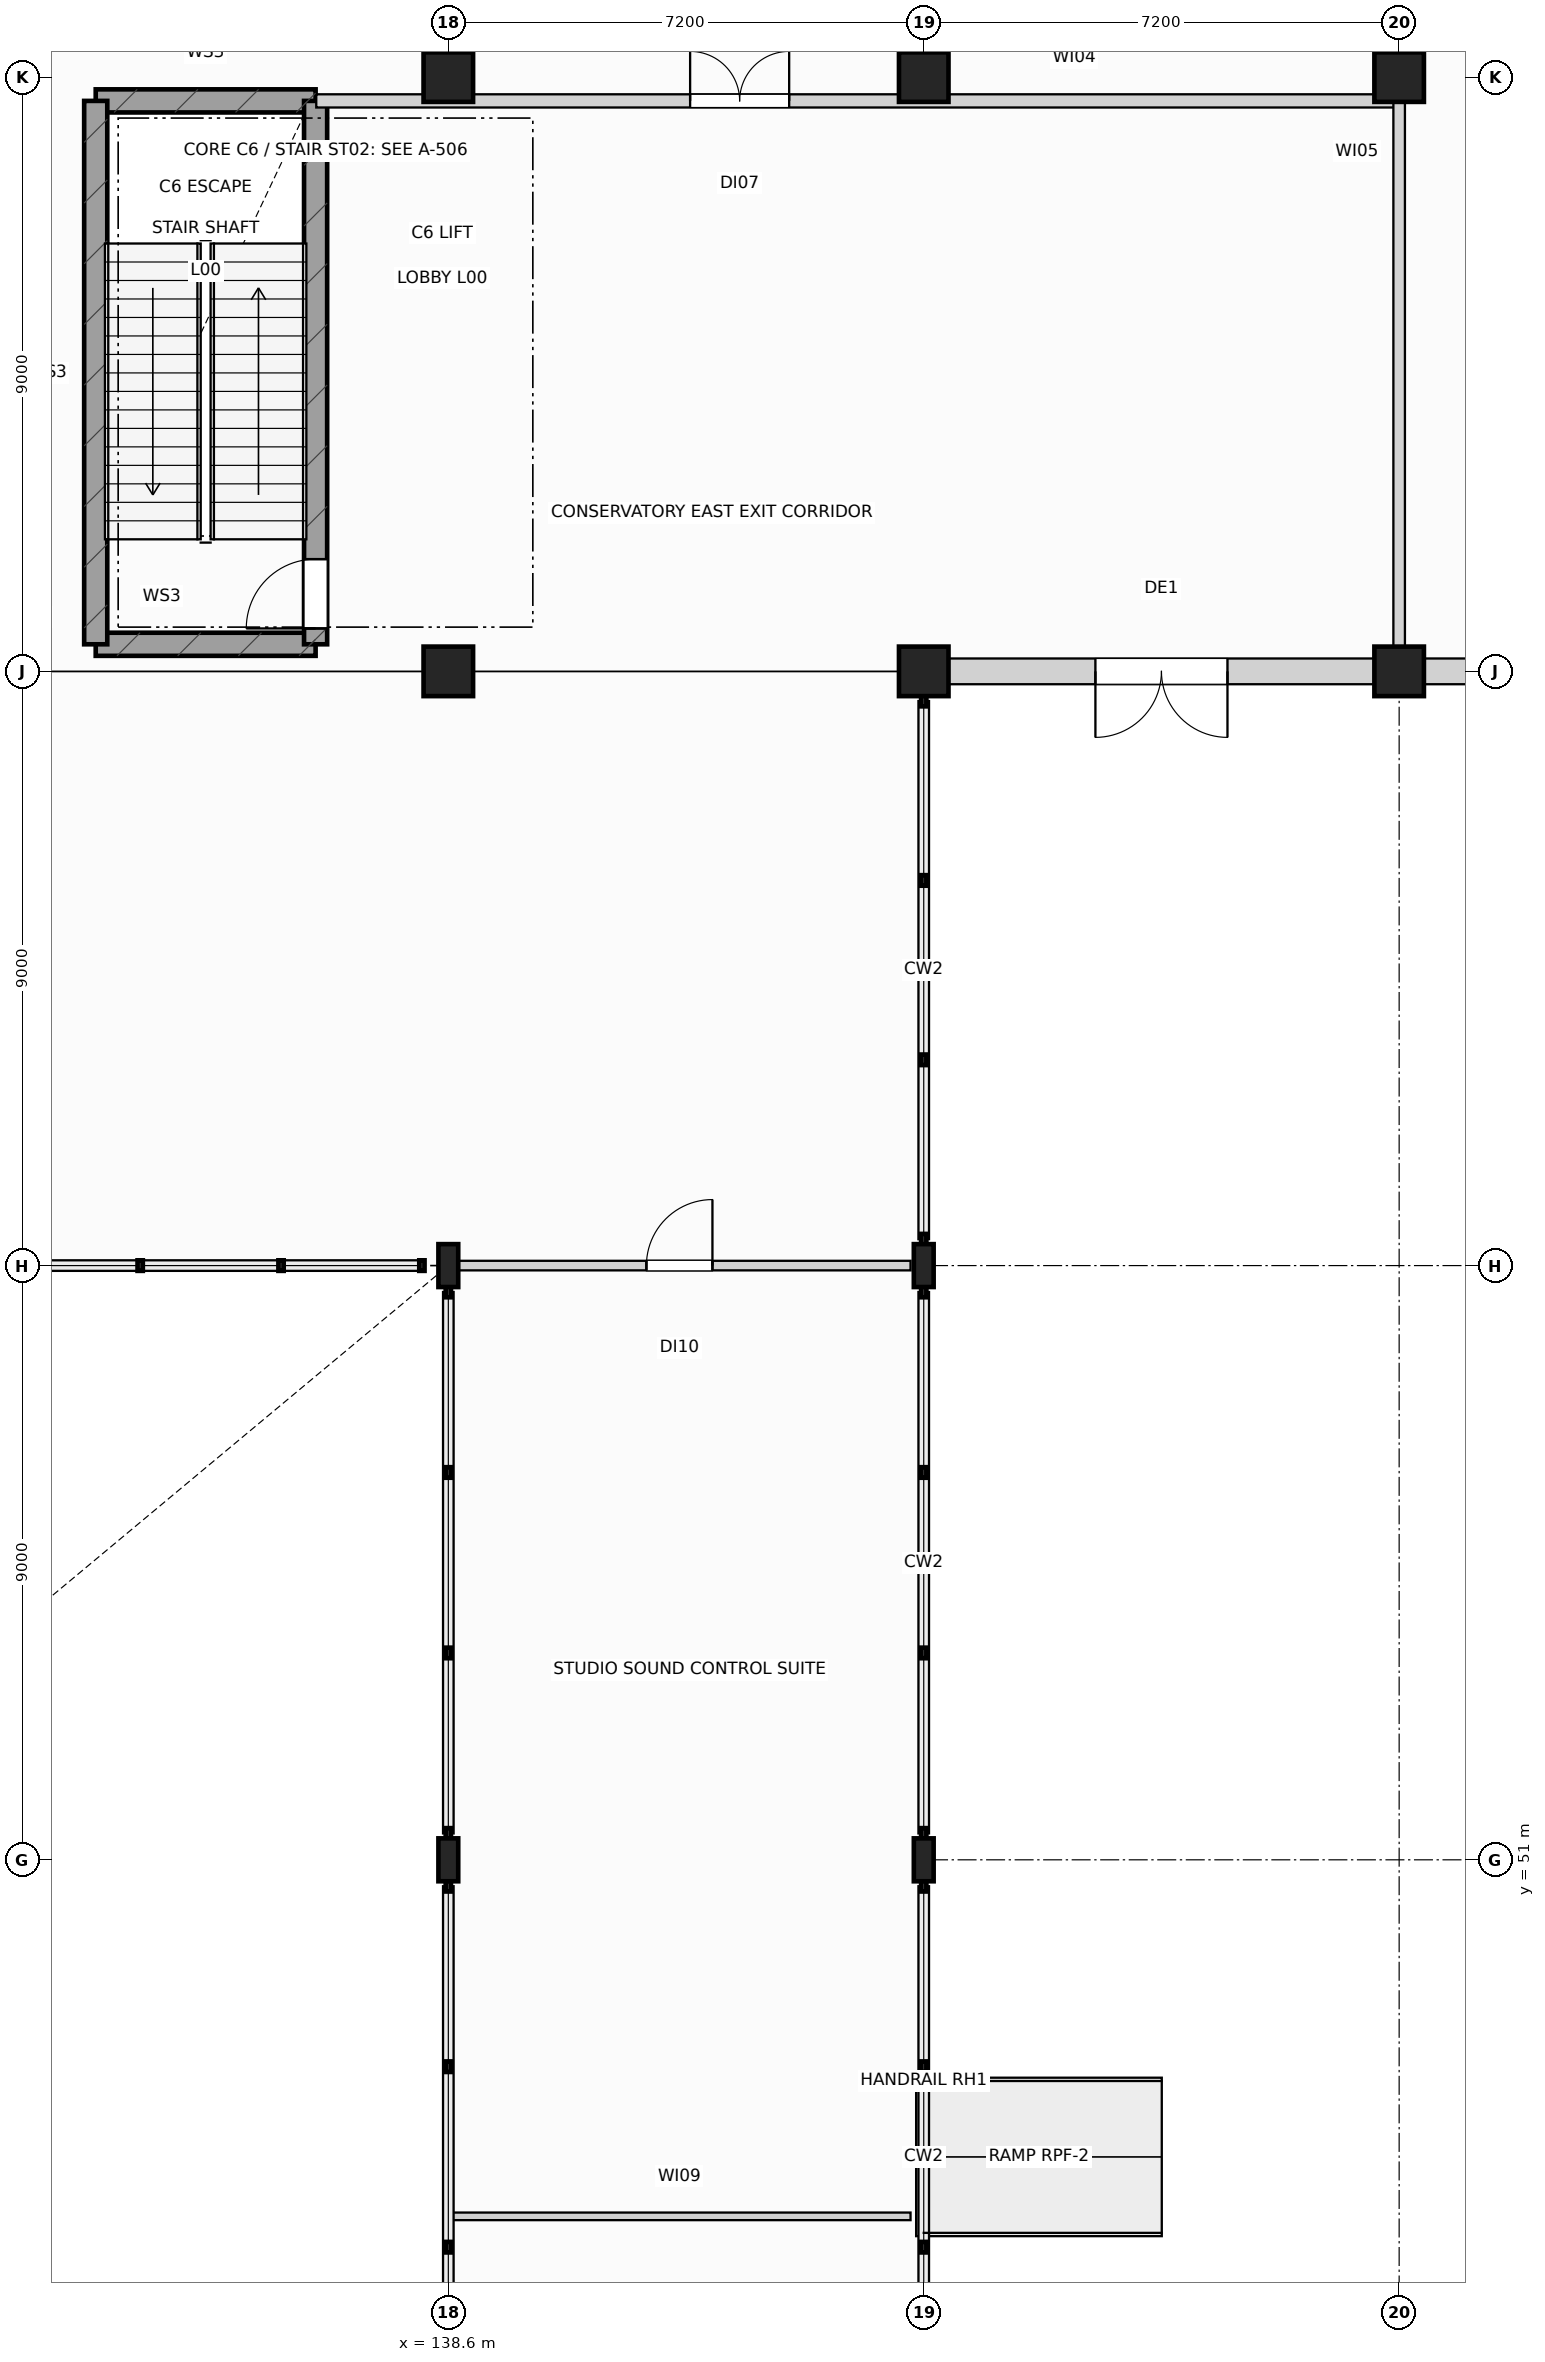
"""IFC4 building model, lengths in metres.
Left out: names, types, materials, properties, quantities, classifications, styles, units other than length and angle.
Written with IfcOpenShell. Run it as: python <this file> out.ifc"""

import sys

from ifc_helpers import new_model, si_unit, direction, frame, frame_2d, origin, origin_2d, place, context, subcontext, project, spatial, rectangle, i_section, extrude, element, fill, save


model = new_model("IFC4")
c1 = context("Model", 3, precision=1e-05, world=origin(), true_north=direction((0.0, 1.0)))
c2 = subcontext(c1, "Body", "Model", "MODEL_VIEW")
j1 = project(units=[si_unit("LENGTHUNIT", "METRE"), si_unit("PLANEANGLEUNIT", "RADIAN")], contexts=[c1])
p1 = place(None, origin())
s1 = spatial("IfcSite", under=j1, at=p1, CompositionType="ELEMENT")
p2 = place(p1, origin())
s2 = spatial("IfcBuilding", under=s1, at=p2, CompositionType="ELEMENT")
p3 = place(p2, origin())
s3 = spatial("IfcBuildingStorey", under=s2, at=p3, CompositionType="ELEMENT", Elevation=0.0)
for number, where, z_axis, x_axis in (
    (1, (138.6, 51.0, 0.0), (0.0, 0.0, 1.0), (1.0, 0.0, 0.0)),
    (2, (138.6, 60.0, 0.0), (0.0, 0.0, 1.0), (1.0, 0.0, 0.0)),
):
    element("IfcColumn", number, at=place(p3, frame(where, z_axis=z_axis, x_axis=x_axis)), inside=s3, PredefinedType="COLUMN", context=c2, shape_type="SweptSolid", body=[
        extrude(i_section(OverallWidth=0.3, OverallDepth=0.65, WebThickness=0.016, FlangeThickness=0.031, at=origin_2d()), origin(), (0.0, 0.0, 1.0), 6.0),
    ])
for number, where, z_axis, x_axis in (
    (3, (138.6, 69.0, 0.0), (0.0, 0.0, 1.0), (1.0, 0.0, 0.0)),
    (4, (138.6, 78.0, 0.0), (0.0, 0.0, 1.0), (1.0, 0.0, 0.0)),
):
    element("IfcColumn", number, at=place(p3, frame(where, z_axis=z_axis, x_axis=x_axis)), inside=s3, PredefinedType="COLUMN", context=c2, shape_type="SweptSolid", body=[
        extrude(rectangle(XDim=0.75, YDim=0.75, at=origin_2d()), origin(), (0.0, 0.0, 1.0), 6.0),
    ])
for number, where, z_axis, x_axis in (
    (5, (145.8, 51.0, 0.0), (0.0, 0.0, 1.0), (1.0, 0.0, 0.0)),
    (6, (145.8, 60.0, 0.0), (0.0, 0.0, 1.0), (1.0, 0.0, 0.0)),
):
    element("IfcColumn", number, at=place(p3, frame(where, z_axis=z_axis, x_axis=x_axis)), inside=s3, PredefinedType="COLUMN", context=c2, shape_type="SweptSolid", body=[
        extrude(i_section(OverallWidth=0.3, OverallDepth=0.65, WebThickness=0.016, FlangeThickness=0.031, at=origin_2d()), origin(), (0.0, 0.0, 1.0), 6.0),
    ])
for number, where, z_axis, x_axis in (
    (7, (145.8, 69.0, 0.0), (0.0, 0.0, 1.0), (1.0, 0.0, 0.0)),
    (8, (145.8, 78.0, 0.0), (0.0, 0.0, 1.0), (1.0, 0.0, 0.0)),
    (9, (153.0, 69.0, 0.0), (0.0, 0.0, 1.0), (1.0, 0.0, 0.0)),
    (10, (153.0, 78.0, 0.0), (0.0, 0.0, 1.0), (1.0, 0.0, 0.0)),
):
    element("IfcColumn", number, at=place(p3, frame(where, z_axis=z_axis, x_axis=x_axis)), inside=s3, PredefinedType="COLUMN", context=c2, shape_type="SweptSolid", body=[
        extrude(rectangle(XDim=0.75, YDim=0.75, at=origin_2d()), origin(), (0.0, 0.0, 1.0), 6.0),
    ])
p4 = place(p3, frame((152.63, 69.0, 0.0), z_axis=(0.0, 0.0, 1.0), x_axis=(-1.0, 0.0, 0.0)))
e11 = element("IfcWall", 11, at=p4, inside=s3, PredefinedType="SOLIDWALL", context=c2, shape_type="SweptSolid", body=[
    extrude(rectangle(XDim=6.46, YDim=0.39, at=frame_2d((3.23, 0.0))), origin(), (0.0, 0.0, 1.0), 5.075),
])
p5 = place(p4, frame((2.23, 0.0, 0.0)))
e12 = element("IfcOpeningElement", 12, at=p5, cuts=e11, PredefinedType="OPENING", context=c2, shape_type="SweptSolid", body=[
    extrude(rectangle(XDim=2.0, YDim=2.4, at=frame_2d((1.0, 1.2))), frame((0.0, 0.205, 0.0), z_axis=(0.0, -1.0, 0.0), x_axis=(1.0, 0.0, 0.0)), (0.0, 0.0, 1.0), 0.41),
])
p6 = place(p3, frame((159.83, 69.0, 0.0), z_axis=(0.0, 0.0, 1.0), x_axis=(-1.0, 0.0, 0.0)))
e13 = element("IfcWall", 13, at=p6, inside=s3, PredefinedType="SOLIDWALL", context=c2, shape_type="SweptSolid", body=[
    extrude(rectangle(XDim=6.46, YDim=0.39, at=frame_2d((3.23, 0.0))), origin(), (0.0, 0.0, 1.0), 5.115),
])
p7 = place(p6, frame((2.33, 0.0, 0.9)))
e14 = element("IfcOpeningElement", 14, at=p7, cuts=e13, PredefinedType="OPENING", context=c2, shape_type="SweptSolid", body=[
    extrude(rectangle(XDim=1.8, YDim=2.3, at=frame_2d((0.9, 1.15))), frame((0.0, 0.205, 0.0), z_axis=(0.0, -1.0, 0.0), x_axis=(1.0, 0.0, 0.0)), (0.0, 0.0, 1.0), 0.41),
])
for number, where, z_axis, x_axis in (
    (15, (133.26, 69.41, 0.0), (0.0, 0.0, 1.0), (1.0, 0.0, 0.0)),
    (16, (133.26, 77.64, 0.0), (0.0, 0.0, 1.0), (1.0, 0.0, 0.0)),
):
    element("IfcWall", number, at=place(p3, frame(where, z_axis=z_axis, x_axis=x_axis)), inside=s3, PredefinedType="SHEAR", context=c2, shape_type="SweptSolid", body=[
        extrude(rectangle(XDim=3.33, YDim=0.35, at=frame_2d((1.665, 0.0))), origin(), (0.0, 0.0, 1.0), 5.7),
    ])
p8 = place(p3, frame((133.26, 69.41, 0.0), z_axis=(0.0, 0.0, 1.0), x_axis=(0.0, 1.0, 0.0)))
e17 = element("IfcWall", 17, at=p8, inside=s3, PredefinedType="SHEAR", context=c2, shape_type="SweptSolid", body=[
    extrude(rectangle(XDim=8.23, YDim=0.35, at=frame_2d((4.115, 0.0))), origin(), (0.0, 0.0, 1.0), 5.7),
])
p9 = place(p3, frame((136.59, 69.41, 0.0), z_axis=(0.0, 0.0, 1.0), x_axis=(0.0, 1.0, 0.0)))
e18 = element("IfcWall", 18, at=p9, inside=s3, PredefinedType="SHEAR", context=c2, shape_type="SweptSolid", body=[
    extrude(rectangle(XDim=8.23, YDim=0.35, at=frame_2d((4.115, 0.0))), origin(), (0.0, 0.0, 1.0), 5.7),
])
p10 = place(p9, frame((0.24, 0.0, 0.0)))
e19 = element("IfcOpeningElement", 19, at=p10, cuts=e18, PredefinedType="OPENING", context=c2, shape_type="SweptSolid", body=[
    extrude(rectangle(XDim=1.05, YDim=2.18, at=frame_2d((0.525, 1.09))), frame((0.0, 0.185, 0.0), z_axis=(0.0, -1.0, 0.0), x_axis=(1.0, 0.0, 0.0)), (0.0, 0.0, 1.0), 0.37),
])
p11 = place(p3, frame((136.6, 77.64, 0.0), z_axis=(0.0, 0.0, 1.0), x_axis=(1.0, 0.0, 0.0)))
e20 = element("IfcWall", 20, at=p11, inside=s3, PredefinedType="PARTITIONING", context=c2, shape_type="SweptSolid", body=[
    extrude(rectangle(XDim=16.4, YDim=0.2, at=frame_2d((8.2, 0.0))), origin(), (0.0, 0.0, 1.0), 5.015),
])
p12 = place(p11, frame((5.662, 0.0, 0.0)))
e21 = element("IfcOpeningElement", 21, at=p12, cuts=e20, PredefinedType="OPENING", context=c2, shape_type="SweptSolid", body=[
    extrude(rectangle(XDim=1.5, YDim=2.2, at=frame_2d((0.75, 1.1))), frame((0.0, 0.11, 0.0), z_axis=(0.0, -1.0, 0.0), x_axis=(1.0, 0.0, 0.0)), (0.0, 0.0, 1.0), 0.22),
])
p13 = place(p3, frame((138.6, 45.6, 0.0), z_axis=(0.0, 0.0, 1.0), x_axis=(1.0, 0.0, 0.0)))
e22 = element("IfcWall", 22, at=p13, inside=s3, PredefinedType="PARTITIONING", context=c2, shape_type="SweptSolid", body=[
    extrude(rectangle(XDim=7.0, YDim=0.115, at=frame_2d((3.5, 0.0))), origin(), (0.0, 0.0, 1.0), 5.165),
])
p14 = place(p3, frame((138.6, 60.0, 0.0), z_axis=(0.0, 0.0, 1.0), x_axis=(1.0, 0.0, 0.0)))
e23 = element("IfcWall", 23, at=p14, inside=s3, PredefinedType="PARTITIONING", context=c2, shape_type="SweptSolid", body=[
    extrude(rectangle(XDim=7.0, YDim=0.145, at=frame_2d((3.5, 0.0))), origin(), (0.0, 0.0, 1.0), 4.715),
])
p15 = place(p14, frame((3.0, 0.0, 0.0)))
e24 = element("IfcOpeningElement", 24, at=p15, cuts=e23, PredefinedType="OPENING", context=c2, shape_type="SweptSolid", body=[
    extrude(rectangle(XDim=1.0, YDim=2.12, at=frame_2d((0.5, 1.06))), frame((0.0, 0.083, 0.0), z_axis=(0.0, -1.0, 0.0), x_axis=(1.0, 0.0, 0.0)), (0.0, 0.0, 1.0), 0.165),
])
p16 = place(p3, frame((153.0, 69.0, 0.0), z_axis=(0.0, 0.0, 1.0), x_axis=(0.0, 1.0, 0.0)))
e25 = element("IfcWall", 25, at=p16, inside=s3, PredefinedType="PARTITIONING", context=c2, shape_type="SweptSolid", body=[
    extrude(rectangle(XDim=26.25, YDim=0.175, at=frame_2d((13.125, 0.0))), origin(), (0.0, 0.0, 1.0), 4.715),
])
p17 = place(p16, frame((12.325, 0.0, 0.0)))
e26 = element("IfcOpeningElement", 26, at=p17, cuts=e25, PredefinedType="OPENING", context=c2, shape_type="SweptSolid", body=[
    extrude(rectangle(XDim=1.6, YDim=2.25, at=frame_2d((0.8, 1.125))), frame((0.0, 0.097, 0.0), z_axis=(0.0, -1.0, 0.0), x_axis=(1.0, 0.0, 0.0)), (0.0, 0.0, 1.0), 0.195),
])
p18 = place(p5, origin())
e27 = element("IfcDoor", 27, at=p18, inside=s3, OperationType="DOUBLE_DOOR_SINGLE_SWING", PredefinedType="DOOR", context=c2, shape_type="SweptSolid", body=[
    extrude(rectangle(XDim=2.0, YDim=2.4, at=frame_2d((1.0, 1.2))), frame((0.0, 0.025, 0.0), z_axis=(0.0, -1.0, 0.0), x_axis=(1.0, 0.0, 0.0)), (0.0, 0.0, 1.0), 0.05),
])
fill(e12, e27)
p19 = place(p10, origin())
e28 = element("IfcDoor", 28, at=p19, inside=s3, OperationType="SINGLE_SWING_LEFT", PredefinedType="DOOR", context=c2, shape_type="SweptSolid", body=[
    extrude(rectangle(XDim=1.05, YDim=2.18, at=frame_2d((0.525, 1.09))), frame((0.0, 0.025, 0.0), z_axis=(0.0, -1.0, 0.0), x_axis=(1.0, 0.0, 0.0)), (0.0, 0.0, 1.0), 0.05),
])
fill(e19, e28)
p20 = place(p12, origin())
e29 = element("IfcDoor", 29, at=p20, inside=s3, OperationType="DOUBLE_DOOR_SINGLE_SWING", PredefinedType="DOOR", context=c2, shape_type="SweptSolid", body=[
    extrude(rectangle(XDim=1.5, YDim=2.2, at=frame_2d((0.75, 1.1))), frame((0.0, 0.025, 0.0), z_axis=(0.0, -1.0, 0.0), x_axis=(1.0, 0.0, 0.0)), (0.0, 0.0, 1.0), 0.05),
])
fill(e21, e29)
p21 = place(p15, origin())
e30 = element("IfcDoor", 30, at=p21, inside=s3, OperationType="SINGLE_SWING_RIGHT", PredefinedType="DOOR", context=c2, shape_type="SweptSolid", body=[
    extrude(rectangle(XDim=1.0, YDim=2.12, at=frame_2d((0.5, 1.06))), frame((0.0, 0.025, 0.0), z_axis=(0.0, -1.0, 0.0), x_axis=(1.0, 0.0, 0.0)), (0.0, 0.0, 1.0), 0.05),
])
fill(e24, e30)
save(model, sys.argv[1])
